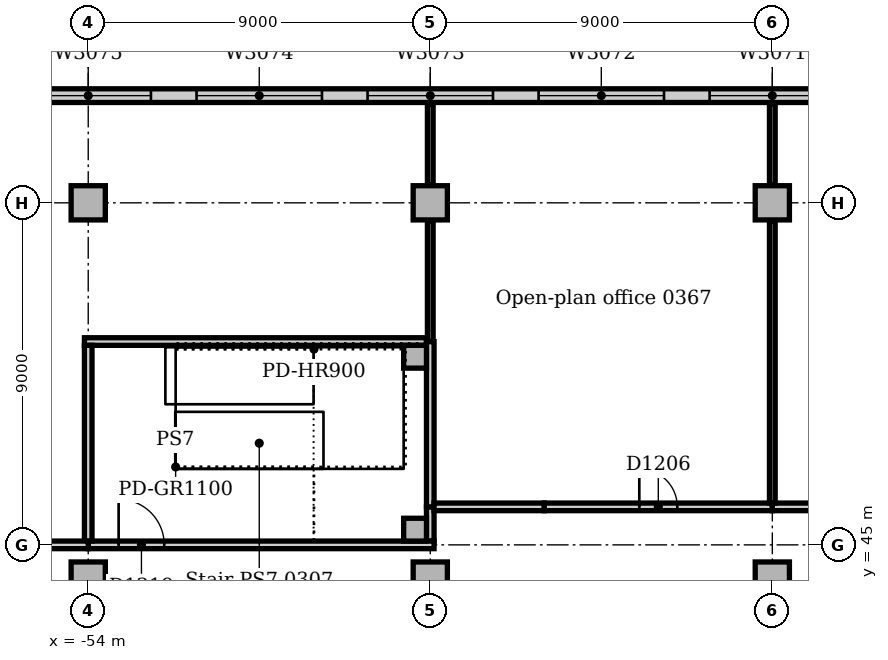
"""IFC4 building model, lengths in metres.
Left out: names, types, materials, properties, quantities, classifications, styles, units other than length and angle.
Written with IfcOpenShell. Run it as: python <this file> out.ifc"""

import sys

from ifc_helpers import new_model, si_unit, direction, frame, frame_2d, origin, origin_2d, place, context, subcontext, project, spatial, rectangle, extrude, element, fill, save


model = new_model("IFC4")
c1 = context("Model", 3, precision=1e-05, world=origin(), true_north=direction((0.0, 1.0)))
c2 = subcontext(c1, "Body", "Model", "MODEL_VIEW")
j1 = project(units=[si_unit("LENGTHUNIT", "METRE"), si_unit("PLANEANGLEUNIT", "RADIAN")], contexts=[c1])
p1 = place(None, origin())
s1 = spatial("IfcSite", under=j1, at=p1, CompositionType="ELEMENT")
p2 = place(p1, origin())
s2 = spatial("IfcBuilding", under=s1, at=p2, CompositionType="ELEMENT")
p3 = place(p2, frame((0.0, 0.0, 16.0)))
s3 = spatial("IfcBuildingStorey", under=s2, at=p3, CompositionType="ELEMENT", Elevation=16.0)
for number, where, z_axis, x_axis in (
    (1, (-54.0, 44.1, 0.0), (0.0, 0.0, 1.0), (1.0, 0.0, 0.0)),
    (2, (-45.0, 44.1, 0.0), (0.0, 0.0, 1.0), (1.0, 0.0, 0.0)),
    (3, (-36.0, 44.1, 0.0), (0.0, 0.0, 1.0), (1.0, 0.0, 0.0)),
    (4, (-54.0, 54.0, 0.0), (0.0, 0.0, 1.0), (1.0, 0.0, 0.0)),
    (5, (-45.0, 54.0, 0.0), (0.0, 0.0, 1.0), (1.0, 0.0, 0.0)),
    (6, (-36.0, 54.0, 0.0), (0.0, 0.0, 1.0), (1.0, 0.0, 0.0)),
):
    element("IfcColumn", number, at=place(p3, frame(where, z_axis=z_axis, x_axis=x_axis)), inside=s3, PredefinedType="COLUMN", context=c2, shape_type="SweptSolid", body=[
        extrude(rectangle(XDim=0.9, YDim=0.9, at=origin_2d()), origin(), (0.0, 0.0, 1.0), 4.7),
    ])
p4 = place(p3, frame((63.0, 56.82, 0.0), z_axis=(0.0, 0.0, 1.0), x_axis=(-1.0, 0.0, 0.0)))
e7 = element("IfcWall", 7, at=p4, inside=s3, PredefinedType="STANDARD", context=c2, shape_type="SweptSolid", body=[
    extrude(rectangle(XDim=144.0, YDim=0.36, at=frame_2d((72.0, 0.0))), origin(), (0.0, 0.0, 1.0), 4.7),
])
p5 = place(p4, frame((2.85, 0.0, 0.9)))
e8 = element("IfcOpeningElement", 8, at=p5, cuts=e7, PredefinedType="OPENING", context=c2, shape_type="SweptSolid", body=[
    extrude(rectangle(XDim=3.3, YDim=2.4, at=frame_2d((1.65, 1.2))), frame((0.0, 0.19, 0.0), z_axis=(0.0, -1.0, 0.0), x_axis=(1.0, 0.0, 0.0)), (0.0, 0.0, 1.0), 0.38),
])
p6 = place(p4, frame((7.35, 0.0, 0.9)))
e9 = element("IfcOpeningElement", 9, at=p6, cuts=e7, PredefinedType="OPENING", context=c2, shape_type="SweptSolid", body=[
    extrude(rectangle(XDim=3.3, YDim=2.4, at=frame_2d((1.65, 1.2))), frame((0.0, 0.19, 0.0), z_axis=(0.0, -1.0, 0.0), x_axis=(1.0, 0.0, 0.0)), (0.0, 0.0, 1.0), 0.38),
])
p7 = place(p4, frame((11.85, 0.0, 0.9)))
e10 = element("IfcOpeningElement", 10, at=p7, cuts=e7, PredefinedType="OPENING", context=c2, shape_type="SweptSolid", body=[
    extrude(rectangle(XDim=3.3, YDim=2.4, at=frame_2d((1.65, 1.2))), frame((0.0, 0.19, 0.0), z_axis=(0.0, -1.0, 0.0), x_axis=(1.0, 0.0, 0.0)), (0.0, 0.0, 1.0), 0.38),
])
p8 = place(p4, frame((16.35, 0.0, 0.9)))
e11 = element("IfcOpeningElement", 11, at=p8, cuts=e7, PredefinedType="OPENING", context=c2, shape_type="SweptSolid", body=[
    extrude(rectangle(XDim=3.3, YDim=2.4, at=frame_2d((1.65, 1.2))), frame((0.0, 0.19, 0.0), z_axis=(0.0, -1.0, 0.0), x_axis=(1.0, 0.0, 0.0)), (0.0, 0.0, 1.0), 0.38),
])
p9 = place(p4, frame((20.85, 0.0, 0.9)))
e12 = element("IfcOpeningElement", 12, at=p9, cuts=e7, PredefinedType="OPENING", context=c2, shape_type="SweptSolid", body=[
    extrude(rectangle(XDim=3.3, YDim=2.4, at=frame_2d((1.65, 1.2))), frame((0.0, 0.19, 0.0), z_axis=(0.0, -1.0, 0.0), x_axis=(1.0, 0.0, 0.0)), (0.0, 0.0, 1.0), 0.38),
])
p10 = place(p4, frame((25.35, 0.0, 0.9)))
e13 = element("IfcOpeningElement", 13, at=p10, cuts=e7, PredefinedType="OPENING", context=c2, shape_type="SweptSolid", body=[
    extrude(rectangle(XDim=3.3, YDim=2.4, at=frame_2d((1.65, 1.2))), frame((0.0, 0.19, 0.0), z_axis=(0.0, -1.0, 0.0), x_axis=(1.0, 0.0, 0.0)), (0.0, 0.0, 1.0), 0.38),
])
p11 = place(p4, frame((29.85, 0.0, 0.9)))
e14 = element("IfcOpeningElement", 14, at=p11, cuts=e7, PredefinedType="OPENING", context=c2, shape_type="SweptSolid", body=[
    extrude(rectangle(XDim=3.3, YDim=2.4, at=frame_2d((1.65, 1.2))), frame((0.0, 0.19, 0.0), z_axis=(0.0, -1.0, 0.0), x_axis=(1.0, 0.0, 0.0)), (0.0, 0.0, 1.0), 0.38),
])
p12 = place(p4, frame((34.35, 0.0, 0.9)))
e15 = element("IfcOpeningElement", 15, at=p12, cuts=e7, PredefinedType="OPENING", context=c2, shape_type="SweptSolid", body=[
    extrude(rectangle(XDim=3.3, YDim=2.4, at=frame_2d((1.65, 1.2))), frame((0.0, 0.19, 0.0), z_axis=(0.0, -1.0, 0.0), x_axis=(1.0, 0.0, 0.0)), (0.0, 0.0, 1.0), 0.38),
])
p13 = place(p4, frame((38.85, 0.0, 0.9)))
e16 = element("IfcOpeningElement", 16, at=p13, cuts=e7, PredefinedType="OPENING", context=c2, shape_type="SweptSolid", body=[
    extrude(rectangle(XDim=3.3, YDim=2.4, at=frame_2d((1.65, 1.2))), frame((0.0, 0.19, 0.0), z_axis=(0.0, -1.0, 0.0), x_axis=(1.0, 0.0, 0.0)), (0.0, 0.0, 1.0), 0.38),
])
p14 = place(p4, frame((43.35, 0.0, 0.9)))
e17 = element("IfcOpeningElement", 17, at=p14, cuts=e7, PredefinedType="OPENING", context=c2, shape_type="SweptSolid", body=[
    extrude(rectangle(XDim=3.3, YDim=2.4, at=frame_2d((1.65, 1.2))), frame((0.0, 0.19, 0.0), z_axis=(0.0, -1.0, 0.0), x_axis=(1.0, 0.0, 0.0)), (0.0, 0.0, 1.0), 0.38),
])
p15 = place(p4, frame((47.85, 0.0, 0.9)))
e18 = element("IfcOpeningElement", 18, at=p15, cuts=e7, PredefinedType="OPENING", context=c2, shape_type="SweptSolid", body=[
    extrude(rectangle(XDim=3.3, YDim=2.4, at=frame_2d((1.65, 1.2))), frame((0.0, 0.19, 0.0), z_axis=(0.0, -1.0, 0.0), x_axis=(1.0, 0.0, 0.0)), (0.0, 0.0, 1.0), 0.38),
])
p16 = place(p4, frame((52.35, 0.0, 0.9)))
e19 = element("IfcOpeningElement", 19, at=p16, cuts=e7, PredefinedType="OPENING", context=c2, shape_type="SweptSolid", body=[
    extrude(rectangle(XDim=3.3, YDim=2.4, at=frame_2d((1.65, 1.2))), frame((0.0, 0.19, 0.0), z_axis=(0.0, -1.0, 0.0), x_axis=(1.0, 0.0, 0.0)), (0.0, 0.0, 1.0), 0.38),
])
p17 = place(p4, frame((56.85, 0.0, 0.9)))
e20 = element("IfcOpeningElement", 20, at=p17, cuts=e7, PredefinedType="OPENING", context=c2, shape_type="SweptSolid", body=[
    extrude(rectangle(XDim=3.3, YDim=2.4, at=frame_2d((1.65, 1.2))), frame((0.0, 0.19, 0.0), z_axis=(0.0, -1.0, 0.0), x_axis=(1.0, 0.0, 0.0)), (0.0, 0.0, 1.0), 0.38),
])
p18 = place(p4, frame((92.85, 0.0, 0.9)))
e21 = element("IfcOpeningElement", 21, at=p18, cuts=e7, PredefinedType="OPENING", context=c2, shape_type="SweptSolid", body=[
    extrude(rectangle(XDim=3.3, YDim=2.4, at=frame_2d((1.65, 1.2))), frame((0.0, 0.19, 0.0), z_axis=(0.0, -1.0, 0.0), x_axis=(1.0, 0.0, 0.0)), (0.0, 0.0, 1.0), 0.38),
])
p19 = place(p4, frame((97.35, 0.0, 0.9)))
e22 = element("IfcOpeningElement", 22, at=p19, cuts=e7, PredefinedType="OPENING", context=c2, shape_type="SweptSolid", body=[
    extrude(rectangle(XDim=3.3, YDim=2.4, at=frame_2d((1.65, 1.2))), frame((0.0, 0.19, 0.0), z_axis=(0.0, -1.0, 0.0), x_axis=(1.0, 0.0, 0.0)), (0.0, 0.0, 1.0), 0.38),
])
p20 = place(p4, frame((101.85, 0.0, 0.9)))
e23 = element("IfcOpeningElement", 23, at=p20, cuts=e7, PredefinedType="OPENING", context=c2, shape_type="SweptSolid", body=[
    extrude(rectangle(XDim=3.3, YDim=2.4, at=frame_2d((1.65, 1.2))), frame((0.0, 0.19, 0.0), z_axis=(0.0, -1.0, 0.0), x_axis=(1.0, 0.0, 0.0)), (0.0, 0.0, 1.0), 0.38),
])
p21 = place(p4, frame((106.35, 0.0, 0.9)))
e24 = element("IfcOpeningElement", 24, at=p21, cuts=e7, PredefinedType="OPENING", context=c2, shape_type="SweptSolid", body=[
    extrude(rectangle(XDim=3.3, YDim=2.4, at=frame_2d((1.65, 1.2))), frame((0.0, 0.19, 0.0), z_axis=(0.0, -1.0, 0.0), x_axis=(1.0, 0.0, 0.0)), (0.0, 0.0, 1.0), 0.38),
])
p22 = place(p4, frame((110.85, 0.0, 0.9)))
e25 = element("IfcOpeningElement", 25, at=p22, cuts=e7, PredefinedType="OPENING", context=c2, shape_type="SweptSolid", body=[
    extrude(rectangle(XDim=3.3, YDim=2.4, at=frame_2d((1.65, 1.2))), frame((0.0, 0.19, 0.0), z_axis=(0.0, -1.0, 0.0), x_axis=(1.0, 0.0, 0.0)), (0.0, 0.0, 1.0), 0.38),
])
p23 = place(p4, frame((115.35, 0.0, 0.9)))
e26 = element("IfcOpeningElement", 26, at=p23, cuts=e7, PredefinedType="OPENING", context=c2, shape_type="SweptSolid", body=[
    extrude(rectangle(XDim=3.3, YDim=2.4, at=frame_2d((1.65, 1.2))), frame((0.0, 0.19, 0.0), z_axis=(0.0, -1.0, 0.0), x_axis=(1.0, 0.0, 0.0)), (0.0, 0.0, 1.0), 0.38),
])
p24 = place(p4, frame((119.85, 0.0, 0.9)))
e27 = element("IfcOpeningElement", 27, at=p24, cuts=e7, PredefinedType="OPENING", context=c2, shape_type="SweptSolid", body=[
    extrude(rectangle(XDim=3.3, YDim=2.4, at=frame_2d((1.65, 1.2))), frame((0.0, 0.19, 0.0), z_axis=(0.0, -1.0, 0.0), x_axis=(1.0, 0.0, 0.0)), (0.0, 0.0, 1.0), 0.38),
])
p25 = place(p4, frame((124.35, 0.0, 0.9)))
e28 = element("IfcOpeningElement", 28, at=p25, cuts=e7, PredefinedType="OPENING", context=c2, shape_type="SweptSolid", body=[
    extrude(rectangle(XDim=3.3, YDim=2.4, at=frame_2d((1.65, 1.2))), frame((0.0, 0.19, 0.0), z_axis=(0.0, -1.0, 0.0), x_axis=(1.0, 0.0, 0.0)), (0.0, 0.0, 1.0), 0.38),
])
p26 = place(p4, frame((128.85, 0.0, 0.9)))
e29 = element("IfcOpeningElement", 29, at=p26, cuts=e7, PredefinedType="OPENING", context=c2, shape_type="SweptSolid", body=[
    extrude(rectangle(XDim=3.3, YDim=2.4, at=frame_2d((1.65, 1.2))), frame((0.0, 0.19, 0.0), z_axis=(0.0, -1.0, 0.0), x_axis=(1.0, 0.0, 0.0)), (0.0, 0.0, 1.0), 0.38),
])
p27 = place(p4, frame((133.35, 0.0, 0.9)))
e30 = element("IfcOpeningElement", 30, at=p27, cuts=e7, PredefinedType="OPENING", context=c2, shape_type="SweptSolid", body=[
    extrude(rectangle(XDim=3.3, YDim=2.4, at=frame_2d((1.65, 1.2))), frame((0.0, 0.19, 0.0), z_axis=(0.0, -1.0, 0.0), x_axis=(1.0, 0.0, 0.0)), (0.0, 0.0, 1.0), 0.38),
])
p28 = place(p4, frame((137.85, 0.0, 0.9)))
e31 = element("IfcOpeningElement", 31, at=p28, cuts=e7, PredefinedType="OPENING", context=c2, shape_type="SweptSolid", body=[
    extrude(rectangle(XDim=3.3, YDim=2.4, at=frame_2d((1.65, 1.2))), frame((0.0, 0.19, 0.0), z_axis=(0.0, -1.0, 0.0), x_axis=(1.0, 0.0, 0.0)), (0.0, 0.0, 1.0), 0.38),
])
for number, where, z_axis, x_axis in (
    (32, (-45.4, 49.95, 0.0), (0.0, 0.0, 1.0), (1.0, 0.0, 0.0)),
    (33, (-45.4, 45.4, 0.0), (0.0, 0.0, 1.0), (1.0, 0.0, 0.0)),
):
    element("IfcColumn", number, at=place(p3, frame(where, z_axis=z_axis, x_axis=x_axis)), inside=s3, PredefinedType="COLUMN", context=c2, shape_type="SweptSolid", body=[
        extrude(rectangle(XDim=0.6, YDim=0.6, at=origin_2d()), origin(), (0.0, 0.0, 1.0), 5.0),
    ])
p29 = place(p3, frame((-45.0, 45.1, 0.0), z_axis=(0.0, 0.0, 1.0), x_axis=(0.0, 1.0, 0.0)))
e34 = element("IfcWall", 34, at=p29, inside=s3, PredefinedType="SOLIDWALL", context=c2, shape_type="SweptSolid", body=[
    extrude(rectangle(XDim=0.9, YDim=0.2, at=frame_2d((0.45, 0.0))), origin(), (0.0, 0.0, 1.0), 4.7),
])
p30 = place(p3, frame((-54.0, 45.0, 0.0), z_axis=(0.0, 0.0, 1.0), x_axis=(1.0, 0.0, 0.0)))
e35 = element("IfcWall", 35, at=p30, inside=s3, PredefinedType="SOLIDWALL", context=c2, shape_type="SweptSolid", body=[
    extrude(rectangle(XDim=9.1, YDim=0.2, at=frame_2d((4.55, 0.0))), origin(), (0.0, 0.0, 1.0), 4.7),
])
p31 = place(p30, frame((0.8, 0.0, 0.0)))
e36 = element("IfcOpeningElement", 36, at=p31, cuts=e35, PredefinedType="OPENING", context=c2, shape_type="SweptSolid", body=[
    extrude(rectangle(XDim=1.2, YDim=2.1, at=frame_2d((0.6, 1.05))), frame((0.0, 0.11, 0.0), z_axis=(0.0, -1.0, 0.0), x_axis=(1.0, 0.0, 0.0)), (0.0, 0.0, 1.0), 0.22),
])
p32 = place(p3, frame((-54.1, 50.35, 0.0), z_axis=(0.0, 0.0, 1.0), x_axis=(1.0, 0.0, 0.0)))
e37 = element("IfcWall", 37, at=p32, inside=s3, PredefinedType="SOLIDWALL", context=c2, shape_type="SweptSolid", body=[
    extrude(rectangle(XDim=9.0, YDim=0.2, at=frame_2d((4.5, 0.0))), origin(), (0.0, 0.0, 1.0), 4.7),
])
p33 = place(p3, frame((-54.0, 45.1, 0.0), z_axis=(0.0, 0.0, 1.0), x_axis=(0.0, 1.0, 0.0)))
e38 = element("IfcWall", 38, at=p33, inside=s3, PredefinedType="SOLIDWALL", context=c2, shape_type="SweptSolid", body=[
    extrude(rectangle(XDim=5.15, YDim=0.2, at=frame_2d((2.575, 0.0))), origin(), (0.0, 0.0, 1.0), 4.7),
])
p34 = place(p3, frame((-45.0, 46.0, 0.0), z_axis=(0.0, 0.0, 1.0), x_axis=(0.0, 1.0, 0.0)))
e39 = element("IfcWall", 39, at=p34, inside=s3, PredefinedType="SOLIDWALL", context=c2, shape_type="SweptSolid", body=[
    extrude(rectangle(XDim=4.35, YDim=0.2, at=frame_2d((2.175, 0.0))), origin(), (0.0, 0.0, 1.0), 4.7),
])
p35 = place(p3, frame((-63.0, 45.0, 0.0), z_axis=(0.0, 0.0, 1.0), x_axis=(1.0, 0.0, 0.0)))
e40 = element("IfcWall", 40, at=p35, inside=s3, PredefinedType="PARTITIONING", context=c2, shape_type="SweptSolid", body=[
    extrude(rectangle(XDim=9.0, YDim=0.2, at=frame_2d((4.5, 0.0))), origin(), (0.0, 0.0, 1.0), 4.7),
])
p36 = place(p35, frame((3.6, 0.0, 0.0)))
e41 = element("IfcOpeningElement", 41, at=p36, cuts=e40, PredefinedType="OPENING", context=c2, shape_type="SweptSolid", body=[
    extrude(rectangle(XDim=1.8, YDim=2.1, at=frame_2d((0.9, 1.05))), frame((0.0, 0.11, 0.0), z_axis=(0.0, -1.0, 0.0), x_axis=(1.0, 0.0, 0.0)), (0.0, 0.0, 1.0), 0.22),
])
p37 = place(p3, frame((-44.9, 46.0, 0.0), z_axis=(0.0, 0.0, 1.0), x_axis=(1.0, 0.0, 0.0)))
e42 = element("IfcWall", 42, at=p37, inside=s3, PredefinedType="PARTITIONING", context=c2, shape_type="SweptSolid", body=[
    extrude(rectangle(XDim=2.9, YDim=0.2, at=frame_2d((1.45, 0.0))), origin(), (0.0, 0.0, 1.0), 4.7),
])
p38 = place(p3, frame((-42.0, 46.0, 0.0), z_axis=(0.0, 0.0, 1.0), x_axis=(1.0, 0.0, 0.0)))
e43 = element("IfcWall", 43, at=p38, inside=s3, PredefinedType="PARTITIONING", context=c2, shape_type="SweptSolid", body=[
    extrude(rectangle(XDim=6.0, YDim=0.2, at=frame_2d((3.0, 0.0))), origin(), (0.0, 0.0, 1.0), 4.7),
])
p39 = place(p38, frame((2.5, 0.0, 0.0)))
e44 = element("IfcOpeningElement", 44, at=p39, cuts=e43, PredefinedType="OPENING", context=c2, shape_type="SweptSolid", body=[
    extrude(rectangle(XDim=1.0, YDim=2.1, at=frame_2d((0.5, 1.05))), frame((0.0, 0.11, 0.0), z_axis=(0.0, -1.0, 0.0), x_axis=(1.0, 0.0, 0.0)), (0.0, 0.0, 1.0), 0.22),
])
p40 = place(p3, frame((-36.0, 46.0, 0.0), z_axis=(0.0, 0.0, 1.0), x_axis=(1.0, 0.0, 0.0)))
e45 = element("IfcWall", 45, at=p40, inside=s3, PredefinedType="PARTITIONING", context=c2, shape_type="SweptSolid", body=[
    extrude(rectangle(XDim=8.9, YDim=0.2, at=frame_2d((4.45, 0.0))), origin(), (0.0, 0.0, 1.0), 4.7),
])
p41 = place(p40, frame((4.0, 0.0, 0.0)))
e46 = element("IfcOpeningElement", 46, at=p41, cuts=e45, PredefinedType="OPENING", context=c2, shape_type="SweptSolid", body=[
    extrude(rectangle(XDim=1.0, YDim=2.1, at=frame_2d((0.5, 1.05))), frame((0.0, 0.11, 0.0), z_axis=(0.0, -1.0, 0.0), x_axis=(1.0, 0.0, 0.0)), (0.0, 0.0, 1.0), 0.22),
])
p42 = place(p3, frame((-45.0, 50.35, 0.0), z_axis=(0.0, 0.0, 1.0), x_axis=(0.0, 1.0, 0.0)))
e47 = element("IfcWall", 47, at=p42, inside=s3, PredefinedType="PARTITIONING", context=c2, shape_type="SweptSolid", body=[
    extrude(rectangle(XDim=3.18, YDim=0.15, at=frame_2d((1.59, 0.0))), origin(), (0.0, 0.0, 1.0), 4.7),
])
p43 = place(p3, frame((-45.0, 54.47, 0.0), z_axis=(0.0, 0.0, 1.0), x_axis=(0.0, 1.0, 0.0)))
e48 = element("IfcWall", 48, at=p43, inside=s3, PredefinedType="PARTITIONING", context=c2, shape_type="SweptSolid", body=[
    extrude(rectangle(XDim=2.13, YDim=0.15, at=frame_2d((1.065, 0.0))), origin(), (0.0, 0.0, 1.0), 4.7),
])
p44 = place(p3, frame((-36.0, 46.1, 0.0), z_axis=(0.0, 0.0, 1.0), x_axis=(0.0, 1.0, 0.0)))
e49 = element("IfcWall", 49, at=p44, inside=s3, PredefinedType="PARTITIONING", context=c2, shape_type="SweptSolid", body=[
    extrude(rectangle(XDim=7.43, YDim=0.15, at=frame_2d((3.715, 0.0))), origin(), (0.0, 0.0, 1.0), 4.7),
])
p45 = place(p3, frame((-36.0, 54.47, 0.0), z_axis=(0.0, 0.0, 1.0), x_axis=(0.0, 1.0, 0.0)))
e50 = element("IfcWall", 50, at=p45, inside=s3, PredefinedType="PARTITIONING", context=c2, shape_type="SweptSolid", body=[
    extrude(rectangle(XDim=2.13, YDim=0.15, at=frame_2d((1.065, 0.0))), origin(), (0.0, 0.0, 1.0), 4.7),
])
p46 = place(p19, origin())
e51 = element("IfcWindow", 51, at=p46, inside=s3, PartitioningType="SINGLE_PANEL", PredefinedType="WINDOW", context=c2, shape_type="SweptSolid", body=[
    extrude(rectangle(XDim=3.3, YDim=2.4, at=frame_2d((1.65, 1.2))), frame((0.0, 0.13, 0.0), z_axis=(0.0, -1.0, 0.0), x_axis=(1.0, 0.0, 0.0)), (0.0, 0.0, 1.0), 0.06),
])
fill(e22, e51)
p47 = place(p20, origin())
e52 = element("IfcWindow", 52, at=p47, inside=s3, PartitioningType="SINGLE_PANEL", PredefinedType="WINDOW", context=c2, shape_type="SweptSolid", body=[
    extrude(rectangle(XDim=3.3, YDim=2.4, at=frame_2d((1.65, 1.2))), frame((0.0, 0.13, 0.0), z_axis=(0.0, -1.0, 0.0), x_axis=(1.0, 0.0, 0.0)), (0.0, 0.0, 1.0), 0.06),
])
fill(e23, e52)
p48 = place(p21, origin())
e53 = element("IfcWindow", 53, at=p48, inside=s3, PartitioningType="SINGLE_PANEL", PredefinedType="WINDOW", context=c2, shape_type="SweptSolid", body=[
    extrude(rectangle(XDim=3.3, YDim=2.4, at=frame_2d((1.65, 1.2))), frame((0.0, 0.13, 0.0), z_axis=(0.0, -1.0, 0.0), x_axis=(1.0, 0.0, 0.0)), (0.0, 0.0, 1.0), 0.06),
])
fill(e24, e53)
p49 = place(p22, origin())
e54 = element("IfcWindow", 54, at=p49, inside=s3, PartitioningType="SINGLE_PANEL", PredefinedType="WINDOW", context=c2, shape_type="SweptSolid", body=[
    extrude(rectangle(XDim=3.3, YDim=2.4, at=frame_2d((1.65, 1.2))), frame((0.0, 0.13, 0.0), z_axis=(0.0, -1.0, 0.0), x_axis=(1.0, 0.0, 0.0)), (0.0, 0.0, 1.0), 0.06),
])
fill(e25, e54)
p50 = place(p23, origin())
e55 = element("IfcWindow", 55, at=p50, inside=s3, PartitioningType="SINGLE_PANEL", PredefinedType="WINDOW", context=c2, shape_type="SweptSolid", body=[
    extrude(rectangle(XDim=3.3, YDim=2.4, at=frame_2d((1.65, 1.2))), frame((0.0, 0.13, 0.0), z_axis=(0.0, -1.0, 0.0), x_axis=(1.0, 0.0, 0.0)), (0.0, 0.0, 1.0), 0.06),
])
fill(e26, e55)
p51 = place(p39, origin())
e56 = element("IfcDoor", 56, at=p51, inside=s3, OperationType="SINGLE_SWING_LEFT", PredefinedType="DOOR", context=c2, shape_type="SweptSolid", body=[
    extrude(rectangle(XDim=1.0, YDim=2.1, at=frame_2d((0.5, 1.05))), frame((0.0, 0.025, 0.0), z_axis=(0.0, -1.0, 0.0), x_axis=(1.0, 0.0, 0.0)), (0.0, 0.0, 1.0), 0.05),
])
fill(e44, e56)
p52 = place(p31, origin())
e57 = element("IfcDoor", 57, at=p52, inside=s3, OperationType="SINGLE_SWING_LEFT", PredefinedType="DOOR", context=c2, shape_type="SweptSolid", body=[
    extrude(rectangle(XDim=1.2, YDim=2.1, at=frame_2d((0.6, 1.05))), frame((0.0, 0.025, 0.0), z_axis=(0.0, -1.0, 0.0), x_axis=(1.0, 0.0, 0.0)), (0.0, 0.0, 1.0), 0.05),
])
fill(e36, e57)
save(model, sys.argv[1])
